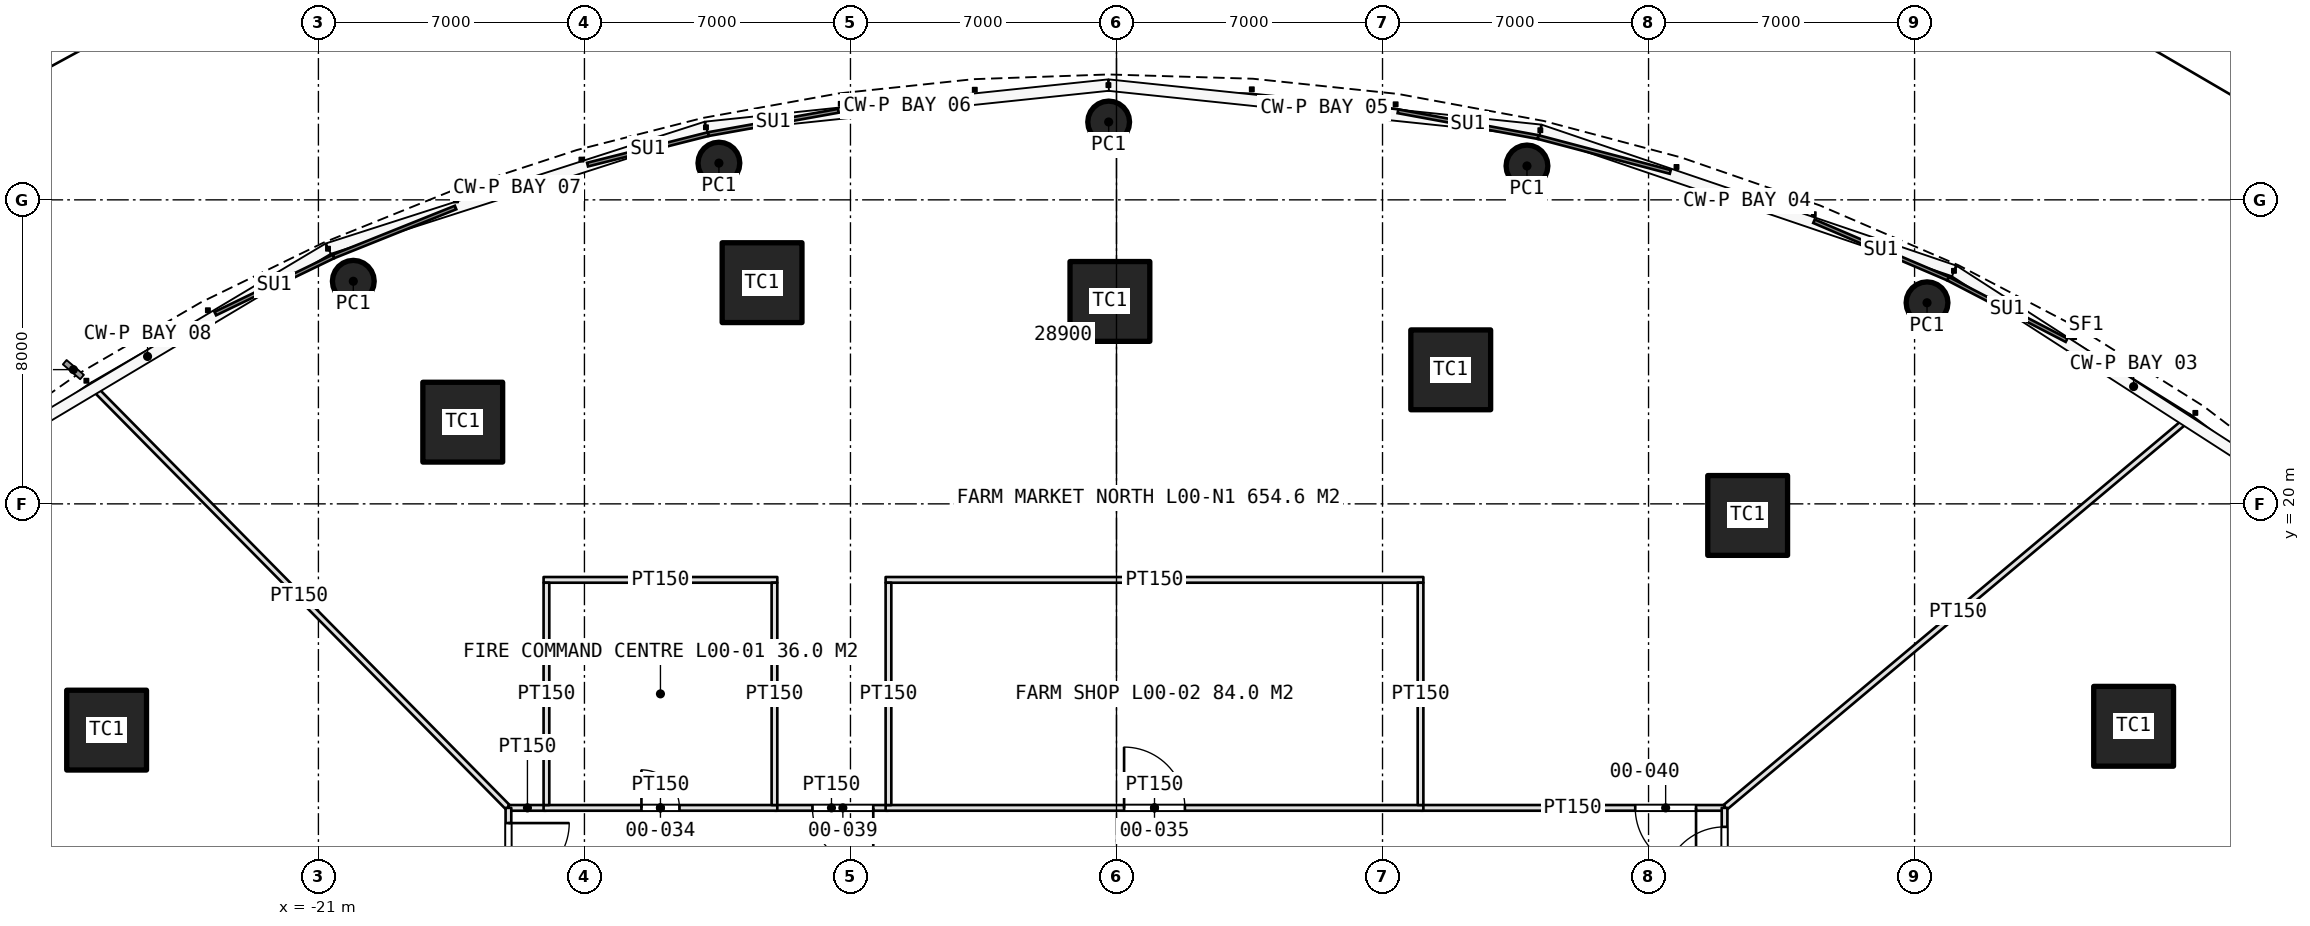
"""IFC4 building model, lengths in metres.
Left out: names, types, materials, properties, quantities, classifications, styles, units other than length and angle.
Written with IfcOpenShell. Run it as: python <this file> out.ifc"""

import sys

from ifc_helpers import new_model, si_unit, direction, frame, frame_2d, origin, origin_2d, place, context, subcontext, project, spatial, rectangle, circle, extrude, element, fill, save


model = new_model("IFC4")
c1 = context("Model", 3, precision=1e-05, world=origin(), true_north=direction((0.0, 1.0)))
c2 = subcontext(c1, "Body", "Model", "MODEL_VIEW")
j1 = project(units=[si_unit("LENGTHUNIT", "METRE"), si_unit("PLANEANGLEUNIT", "RADIAN")], contexts=[c1])
p1 = place(None, origin())
s1 = spatial("IfcSite", under=j1, at=p1, CompositionType="ELEMENT")
p2 = place(p1, origin())
s2 = spatial("IfcBuilding", under=s1, at=p2, CompositionType="ELEMENT")
p3 = place(p2, origin())
s3 = spatial("IfcBuildingStorey", under=s2, at=p3, CompositionType="ELEMENT", Elevation=0.0)
for number, where, z_axis, x_axis in (
    (1, (26.764, 14.147, -0.3), (0.0, 0.0, 1.0), (1.0, 0.0, 0.0)),
    (2, (16.608, 19.695, -0.3), (0.0, 0.0, 1.0), (1.0, 0.0, 0.0)),
    (3, (8.795, 23.527, -0.3), (0.0, 0.0, 1.0), (1.0, 0.0, 0.0)),
    (4, (-0.173, 25.327, -0.3), (0.0, 0.0, 1.0), (1.0, 0.0, 0.0)),
    (5, (-9.326, 25.821, -0.3), (0.0, 0.0, 1.0), (1.0, 0.0, 0.0)),
    (6, (-17.202, 22.15, -0.3), (0.0, 0.0, 1.0), (1.0, 0.0, 0.0)),
    (7, (-26.573, 14.046, -0.3), (0.0, 0.0, 1.0), (1.0, 0.0, 0.0)),
):
    element("IfcColumn", number, at=place(p3, frame(where, z_axis=z_axis, x_axis=x_axis)), inside=s3, PredefinedType="COLUMN", context=c2, shape_type="SweptSolid", body=[
        extrude(rectangle(XDim=2.1, YDim=2.1, at=origin_2d()), origin(), (0.0, 0.0, 1.0), 5.3),
    ])
for number, where, z_axis, x_axis in (
    (8, (21.328, 25.292, -0.3), (0.0, 0.0, 1.0), (1.0, 0.0, 0.0)),
    (9, (10.801, 28.892, -0.3), (0.0, 0.0, 1.0), (1.0, 0.0, 0.0)),
    (10, (-0.206, 30.049, -0.3), (0.0, 0.0, 1.0), (1.0, 0.0, 0.0)),
    (11, (-10.462, 28.967, -0.3), (0.0, 0.0, 1.0), (1.0, 0.0, 0.0)),
    (12, (-20.082, 25.858, -0.3), (0.0, 0.0, 1.0), (1.0, 0.0, 0.0)),
):
    element("IfcColumn", number, at=place(p3, frame(where, z_axis=z_axis, x_axis=x_axis)), inside=s3, PredefinedType="COLUMN", context=c2, shape_type="SweptSolid", body=[
        extrude(circle(Radius=0.55, at=origin_2d()), origin(), (0.0, 0.0, 1.0), 5.3),
    ])
p4 = place(p3, frame((-16.014, 12.014, 0.0), z_axis=(0.0, 0.0, 1.0), x_axis=(-0.702408551969, 0.711773999329, 0.0)))
e13 = element("IfcWall", 13, at=p4, inside=s3, PredefinedType="PARTITIONING", context=c2, shape_type="SweptSolid", body=[
    extrude(rectangle(XDim=15.641, YDim=0.15, at=frame_2d((7.82, 0.0))), origin(), (0.0, 0.0, 1.0), 4.2),
])
p5 = place(p3, frame((16.015, 12.013, 0.0), z_axis=(0.0, 0.0, 1.0), x_axis=(0.765915114931, 0.642941705538, 0.0)))
e14 = element("IfcWall", 14, at=p5, inside=s3, PredefinedType="PARTITIONING", context=c2, shape_type="SweptSolid", body=[
    extrude(rectangle(XDim=16.01, YDim=0.15, at=frame_2d((8.005, 0.0))), origin(), (0.0, 0.0, 1.0), 4.2),
])
p6 = place(p3, frame((-15.0, 12.0, 0.0), z_axis=(0.0, 0.0, 1.0), x_axis=(-1.0, 0.0, 0.0)))
e15 = element("IfcWall", 15, at=p6, inside=s3, PredefinedType="PARTITIONING", context=c2, shape_type="SweptSolid", body=[
    extrude(rectangle(XDim=1.0, YDim=0.15, at=frame_2d((0.5, 0.0))), origin(), (0.0, 0.0, 1.0), 4.2),
])
p7 = place(p3, frame((-6.0, 12.0, 0.0), z_axis=(0.0, 0.0, 1.0), x_axis=(-1.0, 0.0, 0.0)))
e16 = element("IfcWall", 16, at=p7, inside=s3, PredefinedType="PARTITIONING", context=c2, shape_type="SweptSolid", body=[
    extrude(rectangle(XDim=3.0, YDim=0.15, at=frame_2d((1.5, 0.0))), origin(), (0.0, 0.0, 1.0), 4.2),
])
p8 = place(p7, frame((0.4, 0.0, 0.0)))
e17 = element("IfcOpeningElement", 17, at=p8, cuts=e16, PredefinedType="OPENING", context=c2, shape_type="SweptSolid", body=[
    extrude(rectangle(XDim=1.6, YDim=2.4, at=frame_2d((0.8, 1.2))), frame((0.0, 0.085, 0.0), z_axis=(0.0, -1.0, 0.0), x_axis=(1.0, 0.0, 0.0)), (0.0, 0.0, 1.0), 0.17),
])
p9 = place(p3, frame((16.0, 12.0, 0.0), z_axis=(0.0, 0.0, 1.0), x_axis=(-1.0, 0.0, 0.0)))
e18 = element("IfcWall", 18, at=p9, inside=s3, PredefinedType="PARTITIONING", context=c2, shape_type="SweptSolid", body=[
    extrude(rectangle(XDim=8.0, YDim=0.15, at=frame_2d((4.0, 0.0))), origin(), (0.0, 0.0, 1.0), 4.2),
])
p10 = place(p9, frame((0.75, 0.0, 0.0)))
e19 = element("IfcOpeningElement", 19, at=p10, cuts=e18, PredefinedType="OPENING", context=c2, shape_type="SweptSolid", body=[
    extrude(rectangle(XDim=1.6, YDim=2.4, at=frame_2d((0.8, 1.2))), frame((0.0, 0.085, 0.0), z_axis=(0.0, -1.0, 0.0), x_axis=(1.0, 0.0, 0.0)), (0.0, 0.0, 1.0), 0.17),
])
p11 = place(p3, frame((16.0, -12.0, 0.0), z_axis=(0.0, 0.0, 1.0), x_axis=(0.0, 1.0, 0.0)))
e20 = element("IfcWall", 20, at=p11, inside=s3, PredefinedType="PARTITIONING", context=c2, shape_type="SweptSolid", body=[
    extrude(rectangle(XDim=24.0, YDim=0.15, at=frame_2d((12.0, 0.0))), origin(), (0.0, 0.0, 1.0), 4.2),
])
p12 = place(p11, frame((10.4, 0.0, 0.0)))
e21 = element("IfcOpeningElement", 21, at=p12, cuts=e20, PredefinedType="OPENING", context=c2, shape_type="SweptSolid", body=[
    extrude(rectangle(XDim=1.6, YDim=2.4, at=frame_2d((0.8, 1.2))), frame((0.0, 0.085, 0.0), z_axis=(0.0, -1.0, 0.0), x_axis=(1.0, 0.0, 0.0)), (0.0, 0.0, 1.0), 0.17),
])
p13 = place(p11, frame((21.9, 0.0, 0.0)))
e22 = element("IfcOpeningElement", 22, at=p13, cuts=e20, PredefinedType="OPENING", context=c2, shape_type="SweptSolid", body=[
    extrude(rectangle(XDim=1.6, YDim=2.4, at=frame_2d((0.8, 1.2))), frame((0.0, 0.085, 0.0), z_axis=(0.0, -1.0, 0.0), x_axis=(1.0, 0.0, 0.0)), (0.0, 0.0, 1.0), 0.17),
])
p14 = place(p11, frame((0.4, 0.0, 0.0)))
e23 = element("IfcOpeningElement", 23, at=p14, cuts=e20, PredefinedType="OPENING", context=c2, shape_type="SweptSolid", body=[
    extrude(rectangle(XDim=1.6, YDim=2.4, at=frame_2d((0.8, 1.2))), frame((0.0, 0.085, 0.0), z_axis=(0.0, -1.0, 0.0), x_axis=(1.0, 0.0, 0.0)), (0.0, 0.0, 1.0), 0.17),
])
p15 = place(p3, frame((-16.0, 12.0, 0.0), z_axis=(0.0, 0.0, 1.0), x_axis=(0.0, -1.0, 0.0)))
e24 = element("IfcWall", 24, at=p15, inside=s3, PredefinedType="PARTITIONING", context=c2, shape_type="SweptSolid", body=[
    extrude(rectangle(XDim=24.0, YDim=0.15, at=frame_2d((12.0, 0.0))), origin(), (0.0, 0.0, 1.0), 4.2),
])
p16 = place(p15, frame((12.15, 0.0, 0.0)))
e25 = element("IfcOpeningElement", 25, at=p16, cuts=e24, PredefinedType="OPENING", context=c2, shape_type="SweptSolid", body=[
    extrude(rectangle(XDim=1.6, YDim=2.4, at=frame_2d((0.8, 1.2))), frame((0.0, 0.085, 0.0), z_axis=(0.0, -1.0, 0.0), x_axis=(1.0, 0.0, 0.0)), (0.0, 0.0, 1.0), 0.17),
])
p17 = place(p15, frame((0.4, 0.0, 0.0)))
e26 = element("IfcOpeningElement", 26, at=p17, cuts=e24, PredefinedType="OPENING", context=c2, shape_type="SweptSolid", body=[
    extrude(rectangle(XDim=1.6, YDim=2.4, at=frame_2d((0.8, 1.2))), frame((0.0, 0.085, 0.0), z_axis=(0.0, -1.0, 0.0), x_axis=(1.0, 0.0, 0.0)), (0.0, 0.0, 1.0), 0.17),
])
p18 = place(p15, frame((21.9, 0.0, 0.0)))
e27 = element("IfcOpeningElement", 27, at=p18, cuts=e24, PredefinedType="OPENING", context=c2, shape_type="SweptSolid", body=[
    extrude(rectangle(XDim=1.6, YDim=2.4, at=frame_2d((0.8, 1.2))), frame((0.0, 0.085, 0.0), z_axis=(0.0, -1.0, 0.0), x_axis=(1.0, 0.0, 0.0)), (0.0, 0.0, 1.0), 0.17),
])
p19 = place(p3, frame((-15.075, 12.0, 0.0), z_axis=(0.0, 0.0, 1.0), x_axis=(1.0, 0.0, 0.0)))
e28 = element("IfcWall", 28, at=p19, inside=s3, PredefinedType="PARTITIONING", context=c2, shape_type="SweptSolid", body=[
    extrude(rectangle(XDim=6.15, YDim=0.15, at=frame_2d((3.075, 0.0))), origin(), (0.0, 0.0, 1.0), 4.2),
])
p20 = place(p19, frame((2.575, 0.0, 0.0)))
e29 = element("IfcOpeningElement", 29, at=p20, cuts=e28, PredefinedType="OPENING", context=c2, shape_type="SweptSolid", body=[
    extrude(rectangle(XDim=1.0, YDim=2.2, at=frame_2d((0.5, 1.1))), frame((0.0, 0.085, 0.0), z_axis=(0.0, -1.0, 0.0), x_axis=(1.0, 0.0, 0.0)), (0.0, 0.0, 1.0), 0.17),
])
p21 = place(p3, frame((-15.075, 18.0, 0.0), z_axis=(0.0, 0.0, 1.0), x_axis=(1.0, 0.0, 0.0)))
e30 = element("IfcWall", 30, at=p21, inside=s3, PredefinedType="PARTITIONING", context=c2, shape_type="SweptSolid", body=[
    extrude(rectangle(XDim=6.15, YDim=0.15, at=frame_2d((3.075, 0.0))), origin(), (0.0, 0.0, 1.0), 4.2),
])
for number, where, z_axis, x_axis in (
    (31, (-15.0, 12.075, 0.0), (0.0, 0.0, 1.0), (0.0, 1.0, 0.0)),
    (32, (-9.0, 12.075, 0.0), (0.0, 0.0, 1.0), (0.0, 1.0, 0.0)),
):
    element("IfcWall", number, at=place(p3, frame(where, z_axis=z_axis, x_axis=x_axis)), inside=s3, PredefinedType="PARTITIONING", context=c2, shape_type="SweptSolid", body=[
        extrude(rectangle(XDim=5.85, YDim=0.15, at=frame_2d((2.925, 0.0))), origin(), (0.0, 0.0, 1.0), 4.2),
    ])
p22 = place(p3, frame((-6.075, 12.0, 0.0), z_axis=(0.0, 0.0, 1.0), x_axis=(1.0, 0.0, 0.0)))
e33 = element("IfcWall", 33, at=p22, inside=s3, PredefinedType="PARTITIONING", context=c2, shape_type="SweptSolid", body=[
    extrude(rectangle(XDim=14.15, YDim=0.15, at=frame_2d((7.075, 0.0))), origin(), (0.0, 0.0, 1.0), 4.2),
])
p23 = place(p22, frame((6.275, 0.0, 0.0)))
e34 = element("IfcOpeningElement", 34, at=p23, cuts=e33, PredefinedType="OPENING", context=c2, shape_type="SweptSolid", body=[
    extrude(rectangle(XDim=1.6, YDim=2.4, at=frame_2d((0.8, 1.2))), frame((0.0, 0.085, 0.0), z_axis=(0.0, -1.0, 0.0), x_axis=(1.0, 0.0, 0.0)), (0.0, 0.0, 1.0), 0.17),
])
p24 = place(p3, frame((-6.075, 18.0, 0.0), z_axis=(0.0, 0.0, 1.0), x_axis=(1.0, 0.0, 0.0)))
e35 = element("IfcWall", 35, at=p24, inside=s3, PredefinedType="PARTITIONING", context=c2, shape_type="SweptSolid", body=[
    extrude(rectangle(XDim=14.15, YDim=0.15, at=frame_2d((7.075, 0.0))), origin(), (0.0, 0.0, 1.0), 4.2),
])
for number, where, z_axis, x_axis in (
    (36, (-6.0, 12.075, 0.0), (0.0, 0.0, 1.0), (0.0, 1.0, 0.0)),
    (37, (8.0, 12.075, 0.0), (0.0, 0.0, 1.0), (0.0, 1.0, 0.0)),
):
    element("IfcWall", number, at=place(p3, frame(where, z_axis=z_axis, x_axis=x_axis)), inside=s3, PredefinedType="PARTITIONING", context=c2, shape_type="SweptSolid", body=[
        extrude(rectangle(XDim=5.85, YDim=0.15, at=frame_2d((2.925, 0.0))), origin(), (0.0, 0.0, 1.0), 4.2),
    ])
p25 = place(p20, origin())
e38 = element("IfcDoor", 38, at=p25, inside=s3, OperationType="SINGLE_SWING_LEFT", PredefinedType="DOOR", context=c2, shape_type="SweptSolid", body=[
    extrude(rectangle(XDim=1.0, YDim=2.2, at=frame_2d((0.5, 1.1))), frame((0.0, 0.025, 0.0), z_axis=(0.0, -1.0, 0.0), x_axis=(1.0, 0.0, 0.0)), (0.0, 0.0, 1.0), 0.05),
])
fill(e29, e38)
p26 = place(p23, origin())
e39 = element("IfcDoor", 39, at=p26, inside=s3, OperationType="DOUBLE_DOOR_SINGLE_SWING", PredefinedType="DOOR", context=c2, shape_type="SweptSolid", body=[
    extrude(rectangle(XDim=1.6, YDim=2.4, at=frame_2d((0.8, 1.2))), frame((0.0, 0.025, 0.0), z_axis=(0.0, -1.0, 0.0), x_axis=(1.0, 0.0, 0.0)), (0.0, 0.0, 1.0), 0.05),
])
fill(e34, e39)
p27 = place(p8, origin())
e40 = element("IfcDoor", 40, at=p27, inside=s3, OperationType="DOUBLE_DOOR_SINGLE_SWING", PredefinedType="DOOR", context=c2, shape_type="SweptSolid", body=[
    extrude(rectangle(XDim=1.6, YDim=2.4, at=frame_2d((0.8, 1.2))), frame((0.0, 0.025, 0.0), z_axis=(0.0, -1.0, 0.0), x_axis=(1.0, 0.0, 0.0)), (0.0, 0.0, 1.0), 0.05),
])
fill(e17, e40)
p28 = place(p10, origin())
e41 = element("IfcDoor", 41, at=p28, inside=s3, OperationType="DOUBLE_DOOR_SINGLE_SWING", PredefinedType="DOOR", context=c2, shape_type="SweptSolid", body=[
    extrude(rectangle(XDim=1.6, YDim=2.4, at=frame_2d((0.8, 1.2))), frame((0.0, 0.025, 0.0), z_axis=(0.0, -1.0, 0.0), x_axis=(1.0, 0.0, 0.0)), (0.0, 0.0, 1.0), 0.05),
])
fill(e19, e41)
p29 = place(p13, origin())
e42 = element("IfcDoor", 42, at=p29, inside=s3, OperationType="DOUBLE_DOOR_SINGLE_SWING", PredefinedType="DOOR", context=c2, shape_type="SweptSolid", body=[
    extrude(rectangle(XDim=1.6, YDim=2.4, at=frame_2d((0.8, 1.2))), frame((0.0, 0.025, 0.0), z_axis=(0.0, -1.0, 0.0), x_axis=(1.0, 0.0, 0.0)), (0.0, 0.0, 1.0), 0.05),
])
fill(e22, e42)
p30 = place(p17, origin())
e43 = element("IfcDoor", 43, at=p30, inside=s3, OperationType="DOUBLE_DOOR_SINGLE_SWING", PredefinedType="DOOR", context=c2, shape_type="SweptSolid", body=[
    extrude(rectangle(XDim=1.6, YDim=2.4, at=frame_2d((0.8, 1.2))), frame((0.0, 0.025, 0.0), z_axis=(0.0, -1.0, 0.0), x_axis=(1.0, 0.0, 0.0)), (0.0, 0.0, 1.0), 0.05),
])
fill(e26, e43)
save(model, sys.argv[1])
